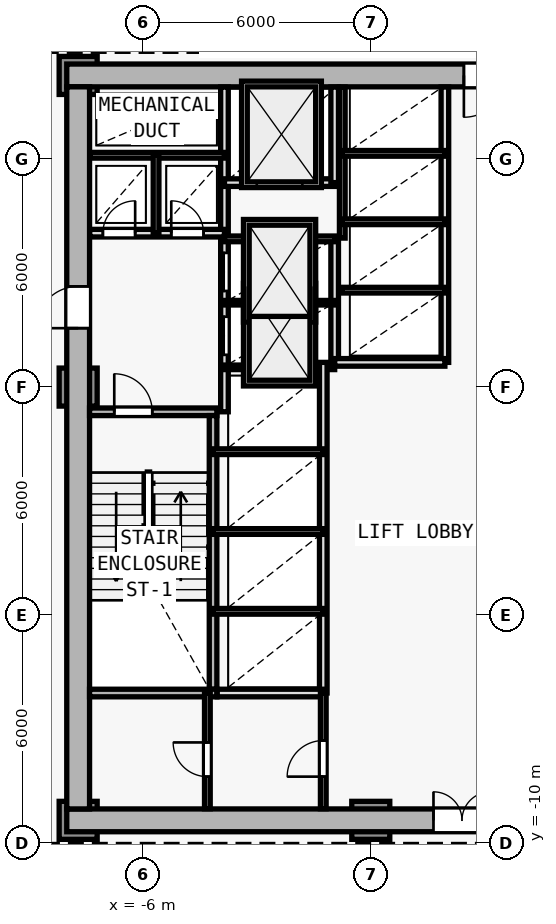
"""IFC4 building model, lengths in metres.
Left out: names, types, materials, properties, quantities, classifications, styles, units other than length and angle.
Written with IfcOpenShell. Run it as: python <this file> out.ifc"""

import sys

from ifc_helpers import new_model, si_unit, direction, frame, frame_2d, origin, origin_2d, place, context, subcontext, project, spatial, rectangle, extrude, element, fill, save


model = new_model("IFC4")
c1 = context("Model", 3, precision=1e-05, world=origin(), true_north=direction((0.0, 1.0)))
c2 = subcontext(c1, "Body", "Model", "MODEL_VIEW")
j1 = project(units=[si_unit("LENGTHUNIT", "METRE"), si_unit("PLANEANGLEUNIT", "RADIAN")], contexts=[c1])
p1 = place(None, origin())
s1 = spatial("IfcSite", under=j1, at=p1, CompositionType="ELEMENT")
p2 = place(p1, origin())
s2 = spatial("IfcBuilding", under=s1, at=p2, CompositionType="ELEMENT")
p3 = place(p2, frame((0.0, 0.0, 21.8)))
s3 = spatial("IfcBuildingStorey", under=s2, at=p3, CompositionType="ELEMENT", Elevation=21.8)
for number, where, z_axis, x_axis in (
    (1, (-7.7, -9.4, 0.0), (0.0, 0.0, 1.0), (1.0, 0.0, 0.0)),
    (2, (-7.7, 10.2, 0.0), (0.0, 0.0, 1.0), (1.0, 0.0, 0.0)),
    (3, (0.0, -9.4, 0.0), (0.0, 0.0, 1.0), (1.0, 0.0, 0.0)),
    (4, (-7.7, 2.0, 0.0), (0.0, 0.0, 1.0), (1.0, 0.0, 0.0)),
):
    element("IfcColumn", number, at=place(p3, frame(where, z_axis=z_axis, x_axis=x_axis)), inside=s3, PredefinedType="COLUMN", context=c2, shape_type="SweptSolid", body=[
        extrude(rectangle(XDim=1.0, YDim=1.0, at=origin_2d()), origin(), (0.0, 0.0, 1.0), 4.6),
    ])
p4 = place(p3, frame((-8.0, -9.4, 0.0), z_axis=(0.0, 0.0, 1.0), x_axis=(1.0, 0.0, 0.0)))
e5 = element("IfcWall", 5, at=p4, inside=s3, PredefinedType="SHEAR", context=c2, shape_type="SweptSolid", body=[
    extrude(rectangle(XDim=16.0, YDim=0.6, at=frame_2d((8.0, 0.0))), origin(), (0.0, 0.0, 1.0), 4.35),
])
p5 = place(p4, frame((9.65, 0.0, 0.0)))
e6 = element("IfcOpeningElement", 6, at=p5, cuts=e5, PredefinedType="OPENING", context=c2, shape_type="SweptSolid", body=[
    extrude(rectangle(XDim=1.5, YDim=2.2, at=frame_2d((0.75, 1.1))), frame((0.0, 0.31, 0.0), z_axis=(0.0, -1.0, 0.0), x_axis=(1.0, 0.0, 0.0)), (0.0, 0.0, 1.0), 0.62),
])
p6 = place(p3, frame((8.0, 10.2, 0.0), z_axis=(0.0, 0.0, 1.0), x_axis=(-1.0, 0.0, 0.0)))
e7 = element("IfcWall", 7, at=p6, inside=s3, PredefinedType="SHEAR", context=c2, shape_type="SweptSolid", body=[
    extrude(rectangle(XDim=16.0, YDim=0.6, at=frame_2d((8.0, 0.0))), origin(), (0.0, 0.0, 1.0), 4.35),
])
p7 = place(p6, frame((4.45, 0.0, 0.0)))
e8 = element("IfcOpeningElement", 8, at=p7, cuts=e7, PredefinedType="OPENING", context=c2, shape_type="SweptSolid", body=[
    extrude(rectangle(XDim=1.1, YDim=2.15, at=frame_2d((0.55, 1.075))), frame((0.0, 0.31, 0.0), z_axis=(0.0, -1.0, 0.0), x_axis=(1.0, 0.0, 0.0)), (0.0, 0.0, 1.0), 0.62),
])
p8 = place(p3, frame((-7.7, -9.1, 0.0), z_axis=(0.0, 0.0, 1.0), x_axis=(0.0, 1.0, 0.0)))
e9 = element("IfcWall", 9, at=p8, inside=s3, PredefinedType="SHEAR", context=c2, shape_type="SweptSolid", body=[
    extrude(rectangle(XDim=19.0, YDim=0.6, at=frame_2d((9.5, 0.0))), origin(), (0.0, 0.0, 1.0), 4.35),
])
p9 = place(p8, frame((12.65, 0.0, 0.0)))
e10 = element("IfcOpeningElement", 10, at=p9, cuts=e9, PredefinedType="OPENING", context=c2, shape_type="SweptSolid", body=[
    extrude(rectangle(XDim=1.1, YDim=2.15, at=frame_2d((0.55, 1.075))), frame((0.0, 0.31, 0.0), z_axis=(0.0, -1.0, 0.0), x_axis=(1.0, 0.0, 0.0)), (0.0, 0.0, 1.0), 0.62),
])
p10 = place(p3, frame((-7.4, 1.35, 0.0), z_axis=(0.0, 0.0, 1.0), x_axis=(1.0, 0.0, 0.0)))
e11 = element("IfcWall", 11, at=p10, inside=s3, PredefinedType="SOLIDWALL", context=c2, shape_type="SweptSolid", body=[
    extrude(rectangle(XDim=3.35, YDim=0.2, at=frame_2d((1.675, 0.0))), origin(), (0.0, 0.0, 1.0), 4.35),
])
p11 = place(p10, frame((0.65, 0.0, 0.0)))
e12 = element("IfcOpeningElement", 12, at=p11, cuts=e11, PredefinedType="OPENING", context=c2, shape_type="SweptSolid", body=[
    extrude(rectangle(XDim=1.0, YDim=2.15, at=frame_2d((0.5, 1.075))), frame((0.0, 0.11, 0.0), z_axis=(0.0, -1.0, 0.0), x_axis=(1.0, 0.0, 0.0)), (0.0, 0.0, 1.0), 0.22),
])
p12 = place(p3, frame((-4.15, -5.95, 0.0), z_axis=(0.0, 0.0, 1.0), x_axis=(0.0, 1.0, 0.0)))
e13 = element("IfcWall", 13, at=p12, inside=s3, PredefinedType="SOLIDWALL", context=c2, shape_type="SweptSolid", body=[
    extrude(rectangle(XDim=7.2, YDim=0.2, at=frame_2d((3.6, 0.0))), origin(), (0.0, 0.0, 1.0), 4.35),
])
p13 = place(p3, frame((-3.85, 1.35, 0.0), z_axis=(0.0, 0.0, 1.0), x_axis=(0.0, 1.0, 0.0)))
e14 = element("IfcWall", 14, at=p13, inside=s3, PredefinedType="SOLIDWALL", context=c2, shape_type="SweptSolid", body=[
    extrude(rectangle(XDim=8.545, YDim=0.2, at=frame_2d((4.272, 0.0))), origin(), (0.0, 0.0, 1.0), 4.35),
])
p14 = place(p13, frame((1.5, 0.0, 0.0)))
e15 = element("IfcOpeningElement", 15, at=p14, cuts=e14, PredefinedType="OPENING", context=c2, shape_type="SweptSolid", body=[
    extrude(rectangle(XDim=1.0, YDim=2.15, at=frame_2d((0.5, 1.075))), frame((0.0, 0.11, 0.0), z_axis=(0.0, -1.0, 0.0), x_axis=(1.0, 0.0, 0.0)), (0.0, 0.0, 1.0), 0.22),
])
p15 = place(p13, frame((3.18, 0.0, 0.0)))
e16 = element("IfcOpeningElement", 16, at=p15, cuts=e14, PredefinedType="OPENING", context=c2, shape_type="SweptSolid", body=[
    extrude(rectangle(XDim=1.0, YDim=2.15, at=frame_2d((0.5, 1.075))), frame((0.0, 0.11, 0.0), z_axis=(0.0, -1.0, 0.0), x_axis=(1.0, 0.0, 0.0)), (0.0, 0.0, 1.0), 0.22),
])
p16 = place(p3, frame((-7.395, 6.05, 0.0), z_axis=(0.0, 0.0, 1.0), x_axis=(1.0, 0.0, 0.0)))
e17 = element("IfcWall", 17, at=p16, inside=s3, PredefinedType="SOLIDWALL", context=c2, shape_type="SweptSolid", body=[
    extrude(rectangle(XDim=3.545, YDim=0.2, at=frame_2d((1.772, 0.0))), origin(), (0.0, 0.0, 1.0), 4.35),
])
p17 = place(p16, frame((0.345, 0.0, 0.0)))
e18 = element("IfcOpeningElement", 18, at=p17, cuts=e17, PredefinedType="OPENING", context=c2, shape_type="SweptSolid", body=[
    extrude(rectangle(XDim=0.85, YDim=2.1, at=frame_2d((0.425, 1.05))), frame((0.0, 0.11, 0.0), z_axis=(0.0, -1.0, 0.0), x_axis=(1.0, 0.0, 0.0)), (0.0, 0.0, 1.0), 0.22),
])
p18 = place(p16, frame((2.145, 0.0, 0.0)))
e19 = element("IfcOpeningElement", 19, at=p18, cuts=e17, PredefinedType="OPENING", context=c2, shape_type="SweptSolid", body=[
    extrude(rectangle(XDim=0.85, YDim=2.1, at=frame_2d((0.425, 1.05))), frame((0.0, 0.11, 0.0), z_axis=(0.0, -1.0, 0.0), x_axis=(1.0, 0.0, 0.0)), (0.0, 0.0, 1.0), 0.22),
])
p19 = place(p3, frame((-7.395, 8.1, 0.0), z_axis=(0.0, 0.0, 1.0), x_axis=(1.0, 0.0, 0.0)))
e20 = element("IfcWall", 20, at=p19, inside=s3, PredefinedType="PARTITIONING", context=c2, shape_type="SweptSolid", body=[
    extrude(rectangle(XDim=3.545, YDim=0.15, at=frame_2d((1.772, 0.0))), origin(), (0.0, 0.0, 1.0), 4.35),
])
p20 = place(p3, frame((-5.65, 6.05, 0.0), z_axis=(0.0, 0.0, 1.0), x_axis=(0.0, 1.0, 0.0)))
e21 = element("IfcWall", 21, at=p20, inside=s3, PredefinedType="PARTITIONING", context=c2, shape_type="SweptSolid", body=[
    extrude(rectangle(XDim=2.05, YDim=0.15, at=frame_2d((1.025, 0.0))), origin(), (0.0, 0.0, 1.0), 4.35),
])
p21 = place(p3, frame((-0.95, 2.65, 0.0), z_axis=(0.0, 0.0, 1.0), x_axis=(0.0, 1.0, 0.0)))
e22 = element("IfcWall", 22, at=p21, inside=s3, PredefinedType="SOLIDWALL", context=c2, shape_type="SweptSolid", body=[
    extrude(rectangle(XDim=3.27, YDim=0.2, at=frame_2d((1.635, 0.0))), origin(), (0.0, 0.0, 1.0), 4.35),
])
for number, where, z_axis, x_axis in (
    (23, (-3.85, 2.52, 0.0), (0.0, 0.0, 1.0), (1.0, 0.0, 0.0)),
    (24, (-3.85, 4.22, 0.0), (0.0, 0.0, 1.0), (1.0, 0.0, 0.0)),
):
    element("IfcWall", number, at=place(p3, frame(where, z_axis=z_axis, x_axis=x_axis)), inside=s3, PredefinedType="PARTITIONING", context=c2, shape_type="SweptSolid", body=[
        extrude(rectangle(XDim=2.9, YDim=0.12, at=frame_2d((1.45, 0.0))), origin(), (0.0, 0.0, 1.0), 4.35),
    ])
p22 = place(p3, frame((-3.85, 5.9, 0.0), z_axis=(0.0, 0.0, 1.0), x_axis=(1.0, 0.0, 0.0)))
e25 = element("IfcWall", 25, at=p22, inside=s3, PredefinedType="PARTITIONING", context=c2, shape_type="SweptSolid", body=[
    extrude(rectangle(XDim=2.9, YDim=0.15, at=frame_2d((1.45, 0.0))), origin(), (0.0, 0.0, 1.0), 4.35),
])
p23 = place(p3, frame((-3.85, 7.38, 0.0), z_axis=(0.0, 0.0, 1.0), x_axis=(1.0, 0.0, 0.0)))
e26 = element("IfcWall", 26, at=p23, inside=s3, PredefinedType="SOLIDWALL", context=c2, shape_type="SweptSolid", body=[
    extrude(rectangle(XDim=2.9, YDim=0.2, at=frame_2d((1.45, 0.0))), origin(), (0.0, 0.0, 1.0), 4.35),
])
p24 = place(p23, frame((0.85, 0.0, 0.0)))
e27 = element("IfcOpeningElement", 27, at=p24, cuts=e26, PredefinedType="OPENING", context=c2, shape_type="SweptSolid", body=[
    extrude(rectangle(XDim=1.2, YDim=2.2, at=frame_2d((0.6, 1.1))), frame((0.0, 0.11, 0.0), z_axis=(0.0, -1.0, 0.0), x_axis=(1.0, 0.0, 0.0)), (0.0, 0.0, 1.0), 0.22),
])
p25 = place(p3, frame((-0.95, 7.38, 0.0), z_axis=(0.0, 0.0, 1.0), x_axis=(0.0, 1.0, 0.0)))
e28 = element("IfcWall", 28, at=p25, inside=s3, PredefinedType="SOLIDWALL", context=c2, shape_type="SweptSolid", body=[
    extrude(rectangle(XDim=2.515, YDim=0.2, at=frame_2d((1.258, 0.0))), origin(), (0.0, 0.0, 1.0), 4.35),
])
p26 = place(p3, frame((-1.25, -6.05, 0.0), z_axis=(0.0, 0.0, 1.0), x_axis=(0.0, 1.0, 0.0)))
e29 = element("IfcWall", 29, at=p26, inside=s3, PredefinedType="SOLIDWALL", context=c2, shape_type="SweptSolid", body=[
    extrude(rectangle(XDim=8.7, YDim=0.2, at=frame_2d((4.35, 0.0))), origin(), (0.0, 0.0, 1.0), 4.35),
])
for number, where, z_axis, x_axis in (
    (30, (-4.15, -3.9, 0.0), (0.0, 0.0, 1.0), (1.0, 0.0, 0.0)),
    (31, (-4.15, -1.8, 0.0), (0.0, 0.0, 1.0), (1.0, 0.0, 0.0)),
    (32, (-4.15, 0.3, 0.0), (0.0, 0.0, 1.0), (1.0, 0.0, 0.0)),
):
    element("IfcWall", number, at=place(p3, frame(where, z_axis=z_axis, x_axis=x_axis)), inside=s3, PredefinedType="PARTITIONING", context=c2, shape_type="SweptSolid", body=[
        extrude(rectangle(XDim=2.9, YDim=0.15, at=frame_2d((1.45, 0.0))), origin(), (0.0, 0.0, 1.0), 4.35),
    ])
p27 = place(p3, frame((1.95, 2.65, 0.0), z_axis=(0.0, 0.0, 1.0), x_axis=(0.0, 1.0, 0.0)))
e33 = element("IfcWall", 33, at=p27, inside=s3, PredefinedType="SOLIDWALL", context=c2, shape_type="SweptSolid", body=[
    extrude(rectangle(XDim=7.245, YDim=0.2, at=frame_2d((3.623, 0.0))), origin(), (0.0, 0.0, 1.0), 4.35),
])
p28 = place(p3, frame((-0.95, 2.65, 0.0), z_axis=(0.0, 0.0, 1.0), x_axis=(1.0, 0.0, 0.0)))
e34 = element("IfcWall", 34, at=p28, inside=s3, PredefinedType="SOLIDWALL", context=c2, shape_type="SweptSolid", body=[
    extrude(rectangle(XDim=2.9, YDim=0.2, at=frame_2d((1.45, 0.0))), origin(), (0.0, 0.0, 1.0), 4.35),
])
p29 = place(p3, frame((-0.75, 5.92, 0.0), z_axis=(0.0, 0.0, 1.0), x_axis=(0.0, 1.0, 0.0)))
e35 = element("IfcWall", 35, at=p29, inside=s3, PredefinedType="PARTITIONING", context=c2, shape_type="SweptSolid", body=[
    extrude(rectangle(XDim=3.975, YDim=0.15, at=frame_2d((1.988, 0.0))), origin(), (0.0, 0.0, 1.0), 4.35),
])
for number, where, z_axis, x_axis in (
    (36, (-0.75, 4.55, 0.0), (0.0, 0.0, 1.0), (1.0, 0.0, 0.0)),
    (37, (-0.75, 6.35, 0.0), (0.0, 0.0, 1.0), (1.0, 0.0, 0.0)),
    (38, (-0.75, 8.15, 0.0), (0.0, 0.0, 1.0), (1.0, 0.0, 0.0)),
):
    element("IfcWall", number, at=place(p3, frame(where, z_axis=z_axis, x_axis=x_axis)), inside=s3, PredefinedType="PARTITIONING", context=c2, shape_type="SweptSolid", body=[
        extrude(rectangle(XDim=2.7, YDim=0.15, at=frame_2d((1.35, 0.0))), origin(), (0.0, 0.0, 1.0), 4.35),
    ])
p30 = place(p3, frame((-7.4, -6.05, 0.0), z_axis=(0.0, 0.0, 1.0), x_axis=(1.0, 0.0, 0.0)))
e39 = element("IfcWall", 39, at=p30, inside=s3, PredefinedType="SOLIDWALL", context=c2, shape_type="SweptSolid", body=[
    extrude(rectangle(XDim=3.35, YDim=0.2, at=frame_2d((1.675, 0.0))), origin(), (0.0, 0.0, 1.0), 4.35),
])
p31 = place(p3, frame((-4.04, -6.05, 0.0), z_axis=(0.0, 0.0, 1.0), x_axis=(1.0, 0.0, 0.0)))
e40 = element("IfcWall", 40, at=p31, inside=s3, PredefinedType="SOLIDWALL", context=c2, shape_type="SweptSolid", body=[
    extrude(rectangle(XDim=2.79, YDim=0.2, at=frame_2d((1.395, 0.0))), origin(), (0.0, 0.0, 1.0), 4.35),
])
p32 = place(p3, frame((-1.25, -9.095, 0.0), z_axis=(0.0, 0.0, 1.0), x_axis=(0.0, 1.0, 0.0)))
e41 = element("IfcWall", 41, at=p32, inside=s3, PredefinedType="PARTITIONING", context=c2, shape_type="SweptSolid", body=[
    extrude(rectangle(XDim=3.045, YDim=0.15, at=frame_2d((1.522, 0.0))), origin(), (0.0, 0.0, 1.0), 4.35),
])
p33 = place(p32, frame((0.845, 0.0, 0.0)))
e42 = element("IfcOpeningElement", 42, at=p33, cuts=e41, PredefinedType="OPENING", context=c2, shape_type="SweptSolid", body=[
    extrude(rectangle(XDim=0.95, YDim=2.1, at=frame_2d((0.475, 1.05))), frame((0.0, 0.085, 0.0), z_axis=(0.0, -1.0, 0.0), x_axis=(1.0, 0.0, 0.0)), (0.0, 0.0, 1.0), 0.17),
])
p34 = place(p3, frame((-4.3, -9.095, 0.0), z_axis=(0.0, 0.0, 1.0), x_axis=(0.0, 1.0, 0.0)))
e43 = element("IfcWall", 43, at=p34, inside=s3, PredefinedType="PARTITIONING", context=c2, shape_type="SweptSolid", body=[
    extrude(rectangle(XDim=3.045, YDim=0.15, at=frame_2d((1.522, 0.0))), origin(), (0.0, 0.0, 1.0), 4.35),
])
p35 = place(p34, frame((0.845, 0.0, 0.0)))
e44 = element("IfcOpeningElement", 44, at=p35, cuts=e43, PredefinedType="OPENING", context=c2, shape_type="SweptSolid", body=[
    extrude(rectangle(XDim=0.9, YDim=2.1, at=frame_2d((0.45, 1.05))), frame((0.0, 0.085, 0.0), z_axis=(0.0, -1.0, 0.0), x_axis=(1.0, 0.0, 0.0)), (0.0, 0.0, 1.0), 0.17),
])
p36 = place(p5, origin())
e45 = element("IfcDoor", 45, at=p36, inside=s3, OperationType="DOUBLE_DOOR_SINGLE_SWING", PredefinedType="DOOR", context=c2, shape_type="SweptSolid", body=[
    extrude(rectangle(XDim=1.5, YDim=2.2, at=frame_2d((0.75, 1.1))), frame((0.0, 0.025, 0.0), z_axis=(0.0, -1.0, 0.0), x_axis=(1.0, 0.0, 0.0)), (0.0, 0.0, 1.0), 0.05),
])
fill(e6, e45)
p37 = place(p9, origin())
e46 = element("IfcDoor", 46, at=p37, inside=s3, OperationType="SINGLE_SWING_LEFT", PredefinedType="DOOR", context=c2, shape_type="SweptSolid", body=[
    extrude(rectangle(XDim=1.1, YDim=2.15, at=frame_2d((0.55, 1.075))), frame((0.0, 0.025, 0.0), z_axis=(0.0, -1.0, 0.0), x_axis=(1.0, 0.0, 0.0)), (0.0, 0.0, 1.0), 0.05),
])
fill(e10, e46)
p38 = place(p7, origin())
e47 = element("IfcDoor", 47, at=p38, inside=s3, OperationType="SINGLE_SWING_RIGHT", PredefinedType="DOOR", context=c2, shape_type="SweptSolid", body=[
    extrude(rectangle(XDim=1.1, YDim=2.15, at=frame_2d((0.55, 1.075))), frame((0.0, 0.025, 0.0), z_axis=(0.0, -1.0, 0.0), x_axis=(1.0, 0.0, 0.0)), (0.0, 0.0, 1.0), 0.05),
])
fill(e8, e47)
p39 = place(p11, origin())
e48 = element("IfcDoor", 48, at=p39, inside=s3, OperationType="SINGLE_SWING_LEFT", PredefinedType="DOOR", context=c2, shape_type="SweptSolid", body=[
    extrude(rectangle(XDim=1.0, YDim=2.15, at=frame_2d((0.5, 1.075))), frame((0.0, 0.025, 0.0), z_axis=(0.0, -1.0, 0.0), x_axis=(1.0, 0.0, 0.0)), (0.0, 0.0, 1.0), 0.05),
])
fill(e12, e48)
p40 = place(p17, origin())
e49 = element("IfcDoor", 49, at=p40, inside=s3, OperationType="SINGLE_SWING_RIGHT", PredefinedType="DOOR", context=c2, shape_type="SweptSolid", body=[
    extrude(rectangle(XDim=0.85, YDim=2.1, at=frame_2d((0.425, 1.05))), frame((0.0, 0.025, 0.0), z_axis=(0.0, -1.0, 0.0), x_axis=(1.0, 0.0, 0.0)), (0.0, 0.0, 1.0), 0.05),
])
fill(e18, e49)
p41 = place(p18, origin())
e50 = element("IfcDoor", 50, at=p41, inside=s3, OperationType="SINGLE_SWING_LEFT", PredefinedType="DOOR", context=c2, shape_type="SweptSolid", body=[
    extrude(rectangle(XDim=0.85, YDim=2.1, at=frame_2d((0.425, 1.05))), frame((0.0, 0.025, 0.0), z_axis=(0.0, -1.0, 0.0), x_axis=(1.0, 0.0, 0.0)), (0.0, 0.0, 1.0), 0.05),
])
fill(e19, e50)
p42 = place(p24, origin())
e51 = element("IfcDoor", 51, at=p42, inside=s3, OperationType="DOUBLE_DOOR_SLIDING", PredefinedType="DOOR", context=c2, shape_type="SweptSolid", body=[
    extrude(rectangle(XDim=1.2, YDim=2.2, at=frame_2d((0.6, 1.1))), frame((0.0, 0.025, 0.0), z_axis=(0.0, -1.0, 0.0), x_axis=(1.0, 0.0, 0.0)), (0.0, 0.0, 1.0), 0.05),
])
fill(e27, e51)
p43 = place(p14, origin())
e52 = element("IfcDoor", 52, at=p43, inside=s3, OperationType="DOUBLE_DOOR_SLIDING", PredefinedType="DOOR", context=c2, shape_type="SweptSolid", body=[
    extrude(rectangle(XDim=1.0, YDim=2.15, at=frame_2d((0.5, 1.075))), frame((0.0, 0.025, 0.0), z_axis=(0.0, -1.0, 0.0), x_axis=(1.0, 0.0, 0.0)), (0.0, 0.0, 1.0), 0.05),
])
fill(e15, e52)
p44 = place(p15, origin())
e53 = element("IfcDoor", 53, at=p44, inside=s3, OperationType="DOUBLE_DOOR_SLIDING", PredefinedType="DOOR", context=c2, shape_type="SweptSolid", body=[
    extrude(rectangle(XDim=1.0, YDim=2.15, at=frame_2d((0.5, 1.075))), frame((0.0, 0.025, 0.0), z_axis=(0.0, -1.0, 0.0), x_axis=(1.0, 0.0, 0.0)), (0.0, 0.0, 1.0), 0.05),
])
fill(e16, e53)
p45 = place(p33, origin())
e54 = element("IfcDoor", 54, at=p45, inside=s3, OperationType="SINGLE_SWING_LEFT", PredefinedType="DOOR", context=c2, shape_type="SweptSolid", body=[
    extrude(rectangle(XDim=0.95, YDim=2.1, at=frame_2d((0.475, 1.05))), frame((0.0, 0.025, 0.0), z_axis=(0.0, -1.0, 0.0), x_axis=(1.0, 0.0, 0.0)), (0.0, 0.0, 1.0), 0.05),
])
fill(e42, e54)
p46 = place(p35, origin())
e55 = element("IfcDoor", 55, at=p46, inside=s3, OperationType="SINGLE_SWING_RIGHT", PredefinedType="DOOR", context=c2, shape_type="SweptSolid", body=[
    extrude(rectangle(XDim=0.9, YDim=2.1, at=frame_2d((0.45, 1.05))), frame((0.0, 0.025, 0.0), z_axis=(0.0, -1.0, 0.0), x_axis=(1.0, 0.0, 0.0)), (0.0, 0.0, 1.0), 0.05),
])
fill(e44, e55)
save(model, sys.argv[1])
